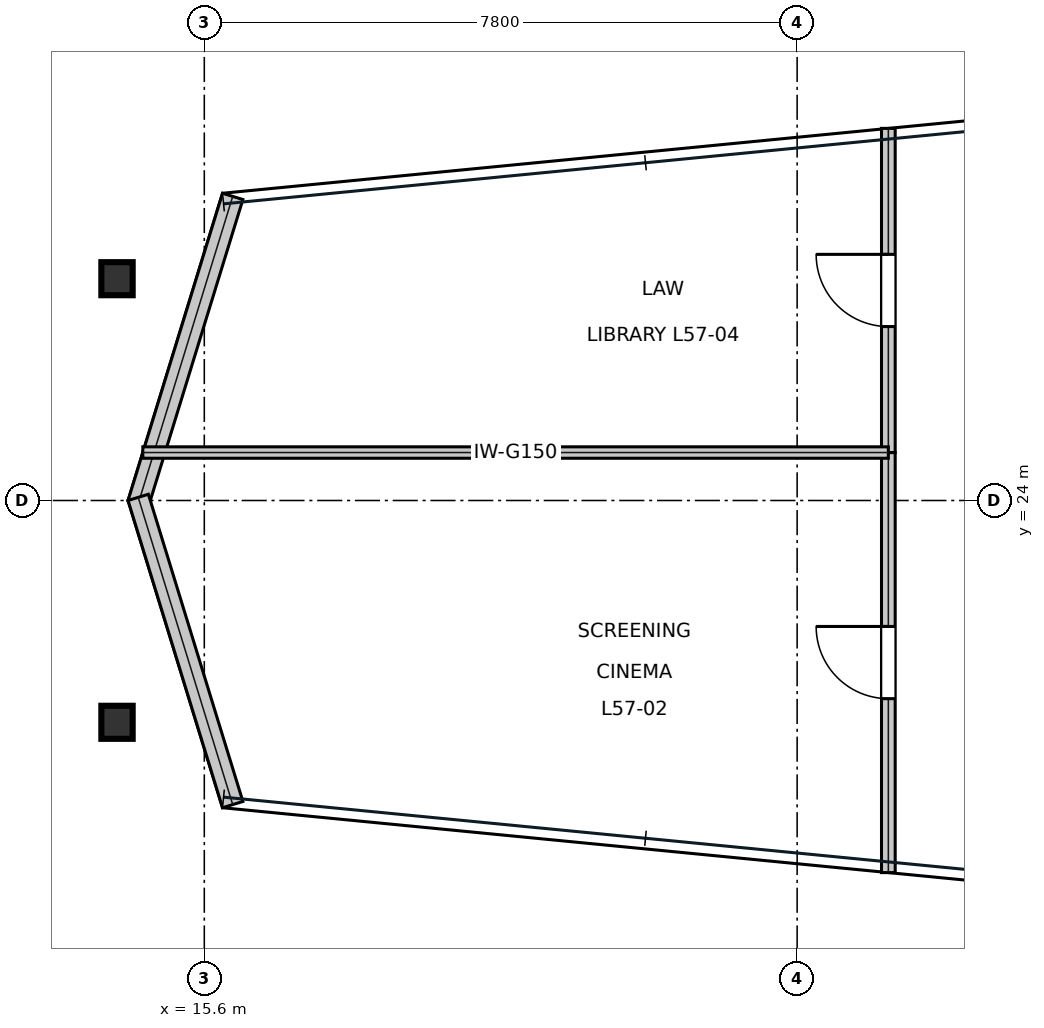
"""IFC4 building model, lengths in metres.
Left out: names, types, materials, properties, quantities, classifications, styles, units other than length and angle.
Written with IfcOpenShell. Run it as: python <this file> out.ifc"""

import sys

from ifc_helpers import new_model, si_unit, direction, frame, frame_2d, origin, origin_2d, place, context, subcontext, project, spatial, rectangle, i_section, extrude, element, fill, save


model = new_model("IFC4")
c1 = context("Model", 3, precision=1e-05, world=origin(), true_north=direction((0.0, 1.0)))
c2 = subcontext(c1, "Body", "Model", "MODEL_VIEW")
j1 = project(units=[si_unit("LENGTHUNIT", "METRE"), si_unit("PLANEANGLEUNIT", "RADIAN")], contexts=[c1])
p1 = place(None, origin())
s1 = spatial("IfcSite", under=j1, at=p1, CompositionType="ELEMENT")
p2 = place(p1, origin())
s2 = spatial("IfcBuilding", under=s1, at=p2, CompositionType="ELEMENT")
p3 = place(p2, frame((0.0, 0.0, 244.5)))
s3 = spatial("IfcBuildingStorey", under=s2, at=p3, CompositionType="ELEMENT", Elevation=244.5)
for number, where, z_axis, x_axis in (
    (1, (14.452, 21.082, 0.016), (0.0, 0.0, 1.0), (1.0, 0.0, 0.0)),
    (2, (14.452, 26.918, 0.016), (0.0, 0.0, 1.0), (1.0, 0.0, 0.0)),
):
    element("IfcColumn", number, at=place(p3, frame(where, z_axis=z_axis, x_axis=x_axis)), inside=s3, PredefinedType="COLUMN", context=c2, shape_type="SweptSolid", body=[
        extrude(i_section(OverallWidth=0.412, OverallDepth=0.435, WebThickness=0.036, FlangeThickness=0.058, at=origin_2d()), origin(), (0.0, 0.0, 1.0), 4.018),
    ])
for number, where, z_axis, x_axis in (
    (3, (15.974, 28.001, 0.0), (0.0, 0.0, 1.0), (-0.294, -0.956, 0.0)),
    (4, (14.731, 24.041, 0.0), (0.0, 0.0, 1.0), (0.294, -0.956, 0.0)),
):
    element("IfcWall", number, at=place(p3, frame(where, z_axis=z_axis, x_axis=x_axis)), inside=s3, PredefinedType="STANDARD", context=c2, shape_type="SweptSolid", body=[
        extrude(rectangle(XDim=4.229, YDim=0.28, at=frame_2d((2.114, 0.0))), origin(), (0.0, 0.0, 1.0), 3.241),
    ])
p4 = place(p3, frame((24.6, 19.104, 0.0), z_axis=(0.0, 0.0, 1.0), x_axis=(0.0, 1.0, 0.0)))
e5 = element("IfcWall", 5, at=p4, inside=s3, PredefinedType="SOLIDWALL", context=c2, shape_type="SweptSolid", body=[
    extrude(rectangle(XDim=5.527, YDim=0.18, at=frame_2d((2.763, 0.0))), origin(), (0.0, 0.0, 1.0), 3.241),
])
p5 = place(p4, frame((2.288, 0.0, 0.0)))
e6 = element("IfcOpeningElement", 6, at=p5, cuts=e5, PredefinedType="OPENING", context=c2, shape_type="SweptSolid", body=[
    extrude(rectangle(XDim=0.95, YDim=2.15, at=frame_2d((0.475, 1.075))), frame((0.0, 0.1, 0.0), z_axis=(0.0, -1.0, 0.0), x_axis=(1.0, 0.0, 0.0)), (0.0, 0.0, 1.0), 0.2),
])
p6 = place(p3, frame((24.6, 24.631, 0.0), z_axis=(0.0, 0.0, 1.0), x_axis=(0.0, 1.0, 0.0)))
e7 = element("IfcWall", 7, at=p6, inside=s3, PredefinedType="SOLIDWALL", context=c2, shape_type="SweptSolid", body=[
    extrude(rectangle(XDim=4.264, YDim=0.18, at=frame_2d((2.132, 0.0))), origin(), (0.0, 0.0, 1.0), 3.241),
])
p7 = place(p6, frame((1.657, 0.0, 0.0)))
e8 = element("IfcOpeningElement", 8, at=p7, cuts=e7, PredefinedType="OPENING", context=c2, shape_type="SweptSolid", body=[
    extrude(rectangle(XDim=0.95, YDim=2.15, at=frame_2d((0.475, 1.075))), frame((0.0, 0.1, 0.0), z_axis=(0.0, -1.0, 0.0), x_axis=(1.0, 0.0, 0.0)), (0.0, 0.0, 1.0), 0.2),
])
p8 = place(p3, frame((14.791, 24.631, 0.0), z_axis=(0.0, 0.0, 1.0), x_axis=(1.0, 0.0, 0.0)))
e9 = element("IfcWall", 9, at=p8, inside=s3, PredefinedType="MOVABLE", context=c2, shape_type="SweptSolid", body=[
    extrude(rectangle(XDim=9.809, YDim=0.15, at=frame_2d((4.905, 0.0))), origin(), (0.0, 0.0, 1.0), 3.468),
])
p9 = place(p5, origin())
e10 = element("IfcDoor", 10, at=p9, inside=s3, OperationType="SINGLE_SWING_RIGHT", PredefinedType="DOOR", context=c2, shape_type="SweptSolid", body=[
    extrude(rectangle(XDim=0.95, YDim=2.15, at=frame_2d((0.475, 1.075))), frame((0.0, 0.025, 0.0), z_axis=(0.0, -1.0, 0.0), x_axis=(1.0, 0.0, 0.0)), (0.0, 0.0, 1.0), 0.05),
])
fill(e6, e10)
p10 = place(p7, origin())
e11 = element("IfcDoor", 11, at=p10, inside=s3, OperationType="SINGLE_SWING_RIGHT", PredefinedType="DOOR", context=c2, shape_type="SweptSolid", body=[
    extrude(rectangle(XDim=0.95, YDim=2.15, at=frame_2d((0.475, 1.075))), frame((0.0, 0.025, 0.0), z_axis=(0.0, -1.0, 0.0), x_axis=(1.0, 0.0, 0.0)), (0.0, 0.0, 1.0), 0.05),
])
fill(e8, e11)
save(model, sys.argv[1])
